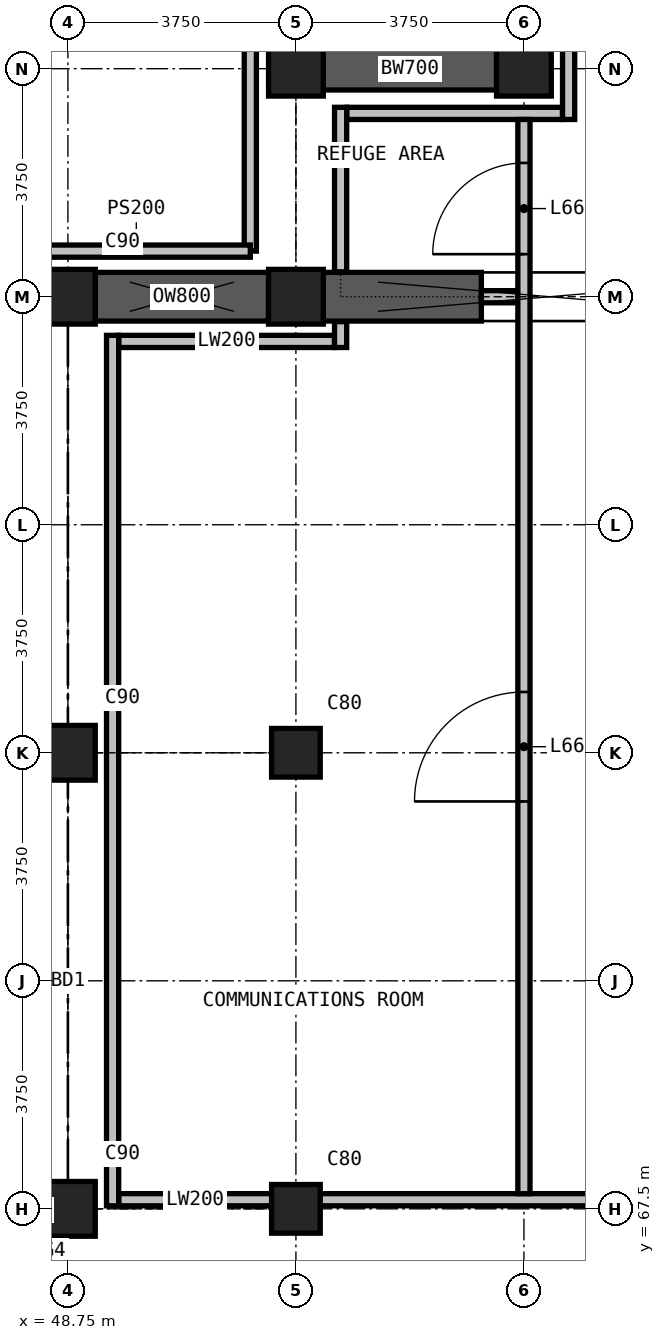
"""IFC4 building model, lengths in metres.
Left out: names, types, materials, properties, quantities, classifications, styles, units other than length and angle.
Written with IfcOpenShell. Run it as: python <this file> out.ifc"""

import sys

from ifc_helpers import new_model, si_unit, direction, frame, frame_2d, origin, origin_2d, place, context, subcontext, project, spatial, rectangle, extrude, element, fill, save


model = new_model("IFC4")
c1 = context("Model", 3, precision=1e-05, world=origin(), true_north=direction((0.0, 1.0)))
c2 = subcontext(c1, "Body", "Model", "MODEL_VIEW")
j1 = project(units=[si_unit("LENGTHUNIT", "METRE"), si_unit("PLANEANGLEUNIT", "RADIAN")], contexts=[c1])
p1 = place(None, origin())
s1 = spatial("IfcSite", under=j1, at=p1, CompositionType="ELEMENT")
p2 = place(p1, origin())
s2 = spatial("IfcBuilding", under=s1, at=p2, CompositionType="ELEMENT")
p3 = place(p2, frame((0.0, 0.0, 253.5)))
s3 = spatial("IfcBuildingStorey", under=s2, at=p3, CompositionType="ELEMENT", Elevation=253.5)
for number, where, z_axis, x_axis in (
    (1, (48.75, 67.5, 0.0), (0.0, 0.0, 1.0), (1.0, 0.0, 0.0)),
    (2, (48.75, 75.0, 0.0), (0.0, 0.0, 1.0), (1.0, 0.0, 0.0)),
    (3, (48.75, 82.5, 0.0), (0.0, 0.0, 1.0), (1.0, 0.0, 0.0)),
):
    element("IfcColumn", number, at=place(p3, frame(where, z_axis=z_axis, x_axis=x_axis)), inside=s3, PredefinedType="COLUMN", context=c2, shape_type="SweptSolid", body=[
        extrude(rectangle(XDim=0.9, YDim=0.9, at=origin_2d()), origin(), (0.0, 0.0, 1.0), 5.0),
    ])
for number, where, z_axis, x_axis in (
    (4, (52.5, 67.5, 0.0), (0.0, 0.0, 1.0), (1.0, 0.0, 0.0)),
    (5, (52.5, 75.0, 0.0), (0.0, 0.0, 1.0), (1.0, 0.0, 0.0)),
):
    element("IfcColumn", number, at=place(p3, frame(where, z_axis=z_axis, x_axis=x_axis)), inside=s3, PredefinedType="COLUMN", context=c2, shape_type="SweptSolid", body=[
        extrude(rectangle(XDim=0.8, YDim=0.8, at=origin_2d()), origin(), (0.0, 0.0, 1.0), 5.0),
    ])
for number, where, z_axis, x_axis in (
    (6, (52.5, 82.5, 0.0), (0.0, 0.0, 1.0), (1.0, 0.0, 0.0)),
    (7, (52.5, 86.25, 0.0), (0.0, 0.0, 1.0), (1.0, 0.0, 0.0)),
    (8, (56.25, 86.25, 0.0), (0.0, 0.0, 1.0), (1.0, 0.0, 0.0)),
):
    element("IfcColumn", number, at=place(p3, frame(where, z_axis=z_axis, x_axis=x_axis)), inside=s3, PredefinedType="COLUMN", context=c2, shape_type="SweptSolid", body=[
        extrude(rectangle(XDim=0.9, YDim=0.9, at=origin_2d()), origin(), (0.0, 0.0, 1.0), 5.0),
    ])
p4 = place(p3, frame((52.95, 86.25, 0.0), z_axis=(0.0, 0.0, 1.0), x_axis=(1.0, 0.0, 0.0)))
e9 = element("IfcWall", 9, at=p4, inside=s3, PredefinedType="SHEAR", context=c2, shape_type="SweptSolid", body=[
    extrude(rectangle(XDim=2.85, YDim=0.7, at=frame_2d((1.425, 0.0))), origin(), (0.0, 0.0, 1.0), 4.7),
])
p5 = place(p3, frame((49.2, 82.5, 0.0), z_axis=(0.0, 0.0, 1.0), x_axis=(1.0, 0.0, 0.0)))
e10 = element("IfcWall", 10, at=p5, inside=s3, PredefinedType="SHEAR", context=c2, shape_type="SweptSolid", body=[
    extrude(rectangle(XDim=2.85, YDim=0.8, at=frame_2d((1.425, 0.0))), origin(), (0.0, 0.0, 1.0), 4.7),
])
p6 = place(p3, frame((52.95, 82.5, 0.0), z_axis=(0.0, 0.0, 1.0), x_axis=(1.0, 0.0, 0.0)))
e11 = element("IfcWall", 11, at=p6, inside=s3, PredefinedType="SHEAR", context=c2, shape_type="SweptSolid", body=[
    extrude(rectangle(XDim=2.6, YDim=0.8, at=frame_2d((1.3, 0.0))), origin(), (0.0, 0.0, 1.0), 4.7),
])
for number, where, z_axis, x_axis in (
    (12, (51.75, 83.25, 0.0), (0.0, 0.0, 1.0), (0.0, 1.0, 0.0)),
    (13, (48.0, 83.25, 0.0), (0.0, 0.0, 1.0), (1.0, 0.0, 0.0)),
):
    element("IfcWall", number, at=place(p3, frame(where, z_axis=z_axis, x_axis=x_axis)), inside=s3, PredefinedType="SOLIDWALL", context=c2, shape_type="SweptSolid", body=[
        extrude(rectangle(XDim=3.75, YDim=0.2, at=frame_2d((1.875, 0.0))), origin(), (0.0, 0.0, 1.0), 4.7),
    ])
p7 = place(p3, frame((49.585, 67.65, 0.0), z_axis=(0.0, 0.0, 1.0), x_axis=(1.0, 0.0, 0.0)))
e14 = element("IfcWall", 14, at=p7, inside=s3, PredefinedType="PARTITIONING", context=c2, shape_type="SweptSolid", body=[
    extrude(rectangle(XDim=2.516, YDim=0.2, at=frame_2d((1.258, 0.0))), origin(), (0.0, 0.0, 1.0), 3.9),
])
p8 = place(p3, frame((52.101, 67.65, 0.0), z_axis=(0.0, 0.0, 1.0), x_axis=(1.0, 0.0, 0.0)))
e15 = element("IfcWall", 15, at=p8, inside=s3, PredefinedType="PARTITIONING", context=c2, shape_type="SweptSolid", body=[
    extrude(rectangle(XDim=13.549, YDim=0.2, at=frame_2d((6.774, 0.0))), origin(), (0.0, 0.0, 1.0), 4.7),
])
p9 = place(p3, frame((49.585, 81.765, 0.0), z_axis=(0.0, 0.0, 1.0), x_axis=(1.0, 0.0, 0.0)))
e16 = element("IfcWall", 16, at=p9, inside=s3, PredefinedType="PARTITIONING", context=c2, shape_type="SweptSolid", body=[
    extrude(rectangle(XDim=3.55, YDim=0.2, at=frame_2d((1.775, 0.0))), origin(), (0.0, 0.0, 1.0), 4.7),
])
p10 = place(p3, frame((55.55, 82.5, 0.0), z_axis=(0.0, 0.0, 1.0), x_axis=(1.0, 0.0, 0.0)))
e17 = element("IfcWall", 17, at=p10, inside=s3, PredefinedType="PARTITIONING", context=c2, shape_type="SweptSolid", body=[
    extrude(rectangle(XDim=0.6, YDim=0.2, at=frame_2d((0.3, 0.0))), origin(), (0.0, 0.0, 1.0), 2.4),
])
p11 = place(p3, frame((53.335, 85.515, 0.0), z_axis=(0.0, 0.0, 1.0), x_axis=(1.0, 0.0, 0.0)))
e18 = element("IfcWall", 18, at=p11, inside=s3, PredefinedType="PARTITIONING", context=c2, shape_type="SweptSolid", body=[
    extrude(rectangle(XDim=3.55, YDim=0.2, at=frame_2d((1.775, 0.0))), origin(), (0.0, 0.0, 1.0), 4.7),
])
p12 = place(p3, frame((49.485, 67.55, 0.0), z_axis=(0.0, 0.0, 1.0), x_axis=(0.0, 1.0, 0.0)))
e19 = element("IfcWall", 19, at=p12, inside=s3, PredefinedType="PARTITIONING", context=c2, shape_type="SweptSolid", body=[
    extrude(rectangle(XDim=14.315, YDim=0.2, at=frame_2d((7.157, 0.0))), origin(), (0.0, 0.0, 1.0), 4.7),
])
p13 = place(p3, frame((53.235, 81.665, 0.0), z_axis=(0.0, 0.0, 1.0), x_axis=(0.0, 1.0, 0.0)))
e20 = element("IfcWall", 20, at=p13, inside=s3, PredefinedType="PARTITIONING", context=c2, shape_type="SweptSolid", body=[
    extrude(rectangle(XDim=0.425, YDim=0.2, at=frame_2d((0.212, 0.0))), origin(), (0.0, 0.0, 1.0), 4.7),
])
p14 = place(p3, frame((53.235, 82.91, 0.0), z_axis=(0.0, 0.0, 1.0), x_axis=(0.0, 1.0, 0.0)))
e21 = element("IfcWall", 21, at=p14, inside=s3, PredefinedType="PARTITIONING", context=c2, shape_type="SweptSolid", body=[
    extrude(rectangle(XDim=2.705, YDim=0.2, at=frame_2d((1.353, 0.0))), origin(), (0.0, 0.0, 1.0), 4.7),
])
p15 = place(p3, frame((56.25, 67.75, 0.0), z_axis=(0.0, 0.0, 1.0), x_axis=(0.0, 1.0, 0.0)))
e22 = element("IfcWall", 22, at=p15, inside=s3, PredefinedType="PARTITIONING", context=c2, shape_type="SweptSolid", body=[
    extrude(rectangle(XDim=17.665, YDim=0.2, at=frame_2d((8.833, 0.0))), origin(), (0.0, 0.0, 1.0), 4.7),
])
p16 = place(p15, frame((15.45, 0.0, 0.0)))
e23 = element("IfcOpeningElement", 23, at=p16, cuts=e22, PredefinedType="OPENING", context=c2, shape_type="SweptSolid", body=[
    extrude(rectangle(XDim=1.5, YDim=2.2, at=frame_2d((0.75, 1.1))), frame((0.0, 0.11, 0.0), z_axis=(0.0, -1.0, 0.0), x_axis=(1.0, 0.0, 0.0)), (0.0, 0.0, 1.0), 0.22),
])
p17 = place(p15, frame((6.45, 0.0, 0.0)))
e24 = element("IfcOpeningElement", 24, at=p17, cuts=e22, PredefinedType="OPENING", context=c2, shape_type="SweptSolid", body=[
    extrude(rectangle(XDim=1.8, YDim=2.4, at=frame_2d((0.9, 1.2))), frame((0.0, 0.11, 0.0), z_axis=(0.0, -1.0, 0.0), x_axis=(1.0, 0.0, 0.0)), (0.0, 0.0, 1.0), 0.22),
])
p18 = place(p3, frame((56.985, 85.415, 0.0), z_axis=(0.0, 0.0, 1.0), x_axis=(0.0, 1.0, 0.0)))
e25 = element("IfcWall", 25, at=p18, inside=s3, PredefinedType="PARTITIONING", context=c2, shape_type="SweptSolid", body=[
    extrude(rectangle(XDim=3.95, YDim=0.2, at=frame_2d((1.975, 0.0))), origin(), (0.0, 0.0, 1.0), 4.7),
])
p19 = place(p16, origin())
e26 = element("IfcDoor", 26, at=p19, inside=s3, OperationType="DOUBLE_DOOR_SINGLE_SWING", PredefinedType="DOOR", context=c2, shape_type="SweptSolid", body=[
    extrude(rectangle(XDim=1.5, YDim=2.2, at=frame_2d((0.75, 1.1))), frame((0.0, 0.025, 0.0), z_axis=(0.0, -1.0, 0.0), x_axis=(1.0, 0.0, 0.0)), (0.0, 0.0, 1.0), 0.05),
])
fill(e23, e26)
p20 = place(p17, origin())
e27 = element("IfcDoor", 27, at=p20, inside=s3, OperationType="DOUBLE_DOOR_SINGLE_SWING", PredefinedType="DOOR", context=c2, shape_type="SweptSolid", body=[
    extrude(rectangle(XDim=1.8, YDim=2.4, at=frame_2d((0.9, 1.2))), frame((0.0, 0.025, 0.0), z_axis=(0.0, -1.0, 0.0), x_axis=(1.0, 0.0, 0.0)), (0.0, 0.0, 1.0), 0.05),
])
fill(e24, e27)
save(model, sys.argv[1])
